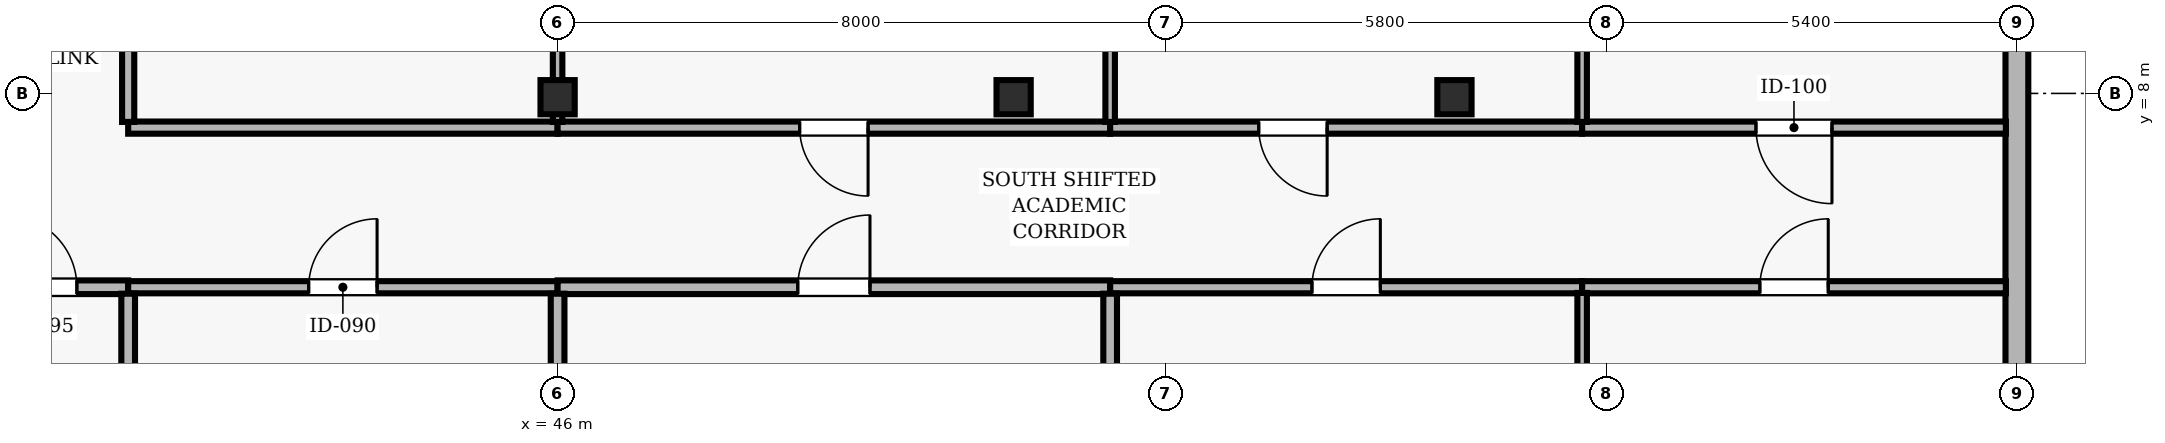
"""IFC4 building model, lengths in metres.
Left out: names, types, materials, properties, quantities, classifications, styles, units other than length and angle.
Written with IfcOpenShell. Run it as: python <this file> out.ifc"""

import sys

from ifc_helpers import new_model, si_unit, direction, frame, frame_2d, origin, origin_2d, place, context, subcontext, project, spatial, rectangle, hollow_rectangle, extrude, element, fill, save


model = new_model("IFC4")
c1 = context("Model", 3, precision=1e-05, world=origin(), true_north=direction((0.0, 1.0)))
c2 = subcontext(c1, "Body", "Model", "MODEL_VIEW")
j1 = project(units=[si_unit("LENGTHUNIT", "METRE"), si_unit("PLANEANGLEUNIT", "RADIAN")], contexts=[c1])
p1 = place(None, origin())
s1 = spatial("IfcSite", under=j1, at=p1, CompositionType="ELEMENT")
p2 = place(p1, origin())
s2 = spatial("IfcBuilding", under=s1, at=p2, CompositionType="ELEMENT")
p3 = place(p2, frame((0.0, 0.0, 203.1)))
s3 = spatial("IfcBuildingStorey", under=s2, at=p3, CompositionType="ELEMENT", Elevation=203.1)
for number, where, z_axis, x_axis in (
    (1, (46.0, 7.95, 0.0), (0.0, 0.0, 1.0), (1.0, 0.0, 0.0)),
    (2, (52.0, 7.95, 0.0), (0.0, 0.0, 1.0), (1.0, 0.0, 0.0)),
    (3, (57.8, 7.95, 0.0), (0.0, 0.0, 1.0), (1.0, 0.0, 0.0)),
):
    element("IfcColumn", number, at=place(p3, frame(where, z_axis=z_axis, x_axis=x_axis)), inside=s3, PredefinedType="COLUMN", context=c2, shape_type="SweptSolid", body=[
        extrude(hollow_rectangle(XDim=0.45, YDim=0.45, WallThickness=0.02, at=origin_2d()), origin(), (0.0, 0.0, 1.0), 3.9),
    ])
p4 = place(p3, frame((65.2, 2.5, 0.0), z_axis=(0.0, 0.0, 1.0), x_axis=(0.0, 1.0, 0.0)))
e4 = element("IfcWall", 4, at=p4, inside=s3, PredefinedType="SOLIDWALL", context=c2, shape_type="SweptSolid", body=[
    extrude(rectangle(XDim=11.0, YDim=0.3, at=frame_2d((5.5, 0.0))), origin(), (0.0, 0.0, 1.0), 3.69),
])
p5 = place(p4, frame((7.2, 0.0, 0.9)))
e5 = element("IfcOpeningElement", 5, at=p5, cuts=e4, PredefinedType="OPENING", context=c2, shape_type="SweptSolid", body=[
    extrude(rectangle(XDim=2.1, YDim=1.6, at=frame_2d((1.05, 0.8))), frame((0.0, 0.16, 0.0), z_axis=(0.0, -1.0, 0.0), x_axis=(1.0, 0.0, 0.0)), (0.0, 0.0, 1.0), 0.32),
])
p6 = place(p3, frame((38.05, 5.45, 0.0), z_axis=(0.0, 0.0, 1.0), x_axis=(1.0, 0.0, 0.0)))
e6 = element("IfcWall", 6, at=p6, inside=s3, PredefinedType="PARTITIONING", context=c2, shape_type="SweptSolid", body=[
    extrude(rectangle(XDim=2.3, YDim=0.18, at=frame_2d((1.15, 0.0))), origin(), (0.0, 0.0, 1.0), 3.372),
])
p7 = place(p6, frame((0.675, 0.0, 0.0)))
e7 = element("IfcOpeningElement", 7, at=p7, cuts=e6, PredefinedType="OPENING", context=c2, shape_type="SweptSolid", body=[
    extrude(rectangle(XDim=0.95, YDim=2.1, at=frame_2d((0.475, 1.05))), frame((0.0, 0.1, 0.0), z_axis=(0.0, -1.0, 0.0), x_axis=(1.0, 0.0, 0.0)), (0.0, 0.0, 1.0), 0.2),
])
p8 = place(p3, frame((40.35, 5.45, 0.0), z_axis=(0.0, 0.0, 1.0), x_axis=(1.0, 0.0, 0.0)))
e8 = element("IfcWall", 8, at=p8, inside=s3, PredefinedType="PARTITIONING", context=c2, shape_type="SweptSolid", body=[
    extrude(rectangle(XDim=5.65, YDim=0.16, at=frame_2d((2.825, 0.0))), origin(), (0.0, 0.0, 1.0), 3.372),
])
p9 = place(p8, frame((2.375, 0.0, 0.0)))
e9 = element("IfcOpeningElement", 9, at=p9, cuts=e8, PredefinedType="OPENING", context=c2, shape_type="SweptSolid", body=[
    extrude(rectangle(XDim=0.9, YDim=2.1, at=frame_2d((0.45, 1.05))), frame((0.0, 0.09, 0.0), z_axis=(0.0, -1.0, 0.0), x_axis=(1.0, 0.0, 0.0)), (0.0, 0.0, 1.0), 0.18),
])
p10 = place(p3, frame((46.0, 5.45, 0.0), z_axis=(0.0, 0.0, 1.0), x_axis=(1.0, 0.0, 0.0)))
e10 = element("IfcWall", 10, at=p10, inside=s3, PredefinedType="PARTITIONING", context=c2, shape_type="SweptSolid", body=[
    extrude(rectangle(XDim=7.27, YDim=0.18, at=frame_2d((3.635, 0.0))), origin(), (0.0, 0.0, 1.0), 3.372),
])
p11 = place(p10, frame((3.16, 0.0, 0.0)))
e11 = element("IfcOpeningElement", 11, at=p11, cuts=e10, PredefinedType="OPENING", context=c2, shape_type="SweptSolid", body=[
    extrude(rectangle(XDim=0.95, YDim=2.1, at=frame_2d((0.475, 1.05))), frame((0.0, 0.1, 0.0), z_axis=(0.0, -1.0, 0.0), x_axis=(1.0, 0.0, 0.0)), (0.0, 0.0, 1.0), 0.2),
])
p12 = place(p3, frame((46.0, 7.55, 0.0), z_axis=(0.0, 0.0, 1.0), x_axis=(-1.0, 0.0, 0.0)))
e12 = element("IfcWall", 12, at=p12, inside=s3, PredefinedType="PARTITIONING", context=c2, shape_type="SweptSolid", body=[
    extrude(rectangle(XDim=5.65, YDim=0.16, at=frame_2d((2.825, 0.0))), origin(), (0.0, 0.0, 1.0), 3.146),
])
p13 = place(p3, frame((53.27, 5.45, 0.0), z_axis=(0.0, 0.0, 1.0), x_axis=(1.0, 0.0, 0.0)))
e13 = element("IfcWall", 13, at=p13, inside=s3, PredefinedType="PARTITIONING", context=c2, shape_type="SweptSolid", body=[
    extrude(rectangle(XDim=6.21, YDim=0.16, at=frame_2d((3.105, 0.0))), origin(), (0.0, 0.0, 1.0), 3.372),
])
p14 = place(p13, frame((2.655, 0.0, 0.0)))
e14 = element("IfcOpeningElement", 14, at=p14, cuts=e13, PredefinedType="OPENING", context=c2, shape_type="SweptSolid", body=[
    extrude(rectangle(XDim=0.9, YDim=2.1, at=frame_2d((0.45, 1.05))), frame((0.0, 0.09, 0.0), z_axis=(0.0, -1.0, 0.0), x_axis=(1.0, 0.0, 0.0)), (0.0, 0.0, 1.0), 0.18),
])
p15 = place(p3, frame((53.27, 7.55, 0.0), z_axis=(0.0, 0.0, 1.0), x_axis=(-1.0, 0.0, 0.0)))
e15 = element("IfcWall", 15, at=p15, inside=s3, PredefinedType="PARTITIONING", context=c2, shape_type="SweptSolid", body=[
    extrude(rectangle(XDim=7.27, YDim=0.16, at=frame_2d((3.635, 0.0))), origin(), (0.0, 0.0, 1.0), 3.146),
])
p16 = place(p15, frame((3.185, 0.0, 0.0)))
e16 = element("IfcOpeningElement", 16, at=p16, cuts=e15, PredefinedType="OPENING", context=c2, shape_type="SweptSolid", body=[
    extrude(rectangle(XDim=0.9, YDim=2.1, at=frame_2d((0.45, 1.05))), frame((0.0, 0.09, 0.0), z_axis=(0.0, -1.0, 0.0), x_axis=(1.0, 0.0, 0.0)), (0.0, 0.0, 1.0), 0.18),
])
p17 = place(p3, frame((59.48, 5.45, 0.0), z_axis=(0.0, 0.0, 1.0), x_axis=(1.0, 0.0, 0.0)))
e17 = element("IfcWall", 17, at=p17, inside=s3, PredefinedType="PARTITIONING", context=c2, shape_type="SweptSolid", body=[
    extrude(rectangle(XDim=5.575, YDim=0.16, at=frame_2d((2.788, 0.0))), origin(), (0.0, 0.0, 1.0), 3.69),
])
p18 = place(p17, frame((2.338, 0.0, 0.0)))
e18 = element("IfcOpeningElement", 18, at=p18, cuts=e17, PredefinedType="OPENING", context=c2, shape_type="SweptSolid", body=[
    extrude(rectangle(XDim=0.9, YDim=2.1, at=frame_2d((0.45, 1.05))), frame((0.0, 0.09, 0.0), z_axis=(0.0, -1.0, 0.0), x_axis=(1.0, 0.0, 0.0)), (0.0, 0.0, 1.0), 0.18),
])
p19 = place(p3, frame((59.48, 7.55, 0.0), z_axis=(0.0, 0.0, 1.0), x_axis=(-1.0, 0.0, 0.0)))
e19 = element("IfcWall", 19, at=p19, inside=s3, PredefinedType="PARTITIONING", context=c2, shape_type="SweptSolid", body=[
    extrude(rectangle(XDim=6.21, YDim=0.16, at=frame_2d((3.105, 0.0))), origin(), (0.0, 0.0, 1.0), 3.146),
])
p20 = place(p19, frame((3.355, 0.0, 0.0)))
e20 = element("IfcOpeningElement", 20, at=p20, cuts=e19, PredefinedType="OPENING", context=c2, shape_type="SweptSolid", body=[
    extrude(rectangle(XDim=0.9, YDim=2.1, at=frame_2d((0.45, 1.05))), frame((0.0, 0.09, 0.0), z_axis=(0.0, -1.0, 0.0), x_axis=(1.0, 0.0, 0.0)), (0.0, 0.0, 1.0), 0.18),
])
p21 = place(p3, frame((65.055, 7.55, 0.0), z_axis=(0.0, 0.0, 1.0), x_axis=(-1.0, 0.0, 0.0)))
e21 = element("IfcWall", 21, at=p21, inside=s3, PredefinedType="PARTITIONING", context=c2, shape_type="SweptSolid", body=[
    extrude(rectangle(XDim=5.575, YDim=0.16, at=frame_2d((2.788, 0.0))), origin(), (0.0, 0.0, 1.0), 3.69),
])
p22 = place(p21, frame((2.288, 0.0, 0.0)))
e22 = element("IfcOpeningElement", 22, at=p22, cuts=e21, PredefinedType="OPENING", context=c2, shape_type="SweptSolid", body=[
    extrude(rectangle(XDim=1.0, YDim=2.1, at=frame_2d((0.5, 1.05))), frame((0.0, 0.09, 0.0), z_axis=(0.0, -1.0, 0.0), x_axis=(1.0, 0.0, 0.0)), (0.0, 0.0, 1.0), 0.18),
])
p23 = place(p3, frame((40.35, 0.145, 0.0), z_axis=(0.0, 0.0, 1.0), x_axis=(0.0, 1.0, 0.0)))
e23 = element("IfcWall", 23, at=p23, inside=s3, PredefinedType="PARTITIONING", context=c2, shape_type="SweptSolid", body=[
    extrude(rectangle(XDim=5.22, YDim=0.18, at=frame_2d((2.61, 0.0))), origin(), (0.0, 0.0, 1.0), 3.69),
])
p24 = place(p3, frame((40.35, 7.625, 0.0), z_axis=(0.0, 0.0, 1.0), x_axis=(0.0, 1.0, 0.0)))
e24 = element("IfcWall", 24, at=p24, inside=s3, PredefinedType="PARTITIONING", context=c2, shape_type="SweptSolid", body=[
    extrude(rectangle(XDim=8.3, YDim=0.16, at=frame_2d((4.15, 0.0))), origin(), (0.0, 0.0, 1.0), 3.372),
])
p25 = place(p24, frame((3.7, 0.0, 0.0)))
e25 = element("IfcOpeningElement", 25, at=p25, cuts=e24, PredefinedType="OPENING", context=c2, shape_type="SweptSolid", body=[
    extrude(rectangle(XDim=0.9, YDim=2.1, at=frame_2d((0.45, 1.05))), frame((0.0, 0.09, 0.0), z_axis=(0.0, -1.0, 0.0), x_axis=(1.0, 0.0, 0.0)), (0.0, 0.0, 1.0), 0.18),
])
p26 = place(p3, frame((46.0, 0.145, 0.0), z_axis=(0.0, 0.0, 1.0), x_axis=(0.0, 1.0, 0.0)))
e26 = element("IfcWall", 26, at=p26, inside=s3, PredefinedType="PARTITIONING", context=c2, shape_type="SweptSolid", body=[
    extrude(rectangle(XDim=5.22, YDim=0.18, at=frame_2d((2.61, 0.0))), origin(), (0.0, 0.0, 1.0), 3.146),
])
p27 = place(p3, frame((46.0, 7.625, 0.0), z_axis=(0.0, 0.0, 1.0), x_axis=(0.0, 1.0, 0.0)))
e27 = element("IfcWall", 27, at=p27, inside=s3, PredefinedType="PARTITIONING", context=c2, shape_type="SweptSolid", body=[
    extrude(rectangle(XDim=8.318, YDim=0.125, at=frame_2d((4.159, 0.0))), origin(), (0.0, 0.0, 1.0), 3.146),
])
p28 = place(p3, frame((53.27, 0.145, 0.0), z_axis=(0.0, 0.0, 1.0), x_axis=(0.0, 1.0, 0.0)))
e28 = element("IfcWall", 28, at=p28, inside=s3, PredefinedType="PARTITIONING", context=c2, shape_type="SweptSolid", body=[
    extrude(rectangle(XDim=5.22, YDim=0.18, at=frame_2d((2.61, 0.0))), origin(), (0.0, 0.0, 1.0), 3.69),
])
p29 = place(p3, frame((53.27, 7.625, 0.0), z_axis=(0.0, 0.0, 1.0), x_axis=(0.0, 1.0, 0.0)))
e29 = element("IfcWall", 29, at=p29, inside=s3, PredefinedType="PARTITIONING", context=c2, shape_type="SweptSolid", body=[
    extrude(rectangle(XDim=8.23, YDim=0.125, at=frame_2d((4.115, 0.0))), origin(), (0.0, 0.0, 1.0), 3.69),
])
p30 = place(p3, frame((59.48, 0.145, 0.0), z_axis=(0.0, 0.0, 1.0), x_axis=(0.0, 1.0, 0.0)))
e30 = element("IfcWall", 30, at=p30, inside=s3, PredefinedType="PARTITIONING", context=c2, shape_type="SweptSolid", body=[
    extrude(rectangle(XDim=5.23, YDim=0.125, at=frame_2d((2.615, 0.0))), origin(), (0.0, 0.0, 1.0), 3.69),
])
p31 = place(p3, frame((59.48, 7.625, 0.0), z_axis=(0.0, 0.0, 1.0), x_axis=(0.0, 1.0, 0.0)))
e31 = element("IfcWall", 31, at=p31, inside=s3, PredefinedType="PARTITIONING", context=c2, shape_type="SweptSolid", body=[
    extrude(rectangle(XDim=8.23, YDim=0.125, at=frame_2d((4.115, 0.0))), origin(), (0.0, 0.0, 1.0), 3.69),
])
p32 = place(p7, origin())
e32 = element("IfcDoor", 32, at=p32, inside=s3, OperationType="SINGLE_SWING_LEFT", PredefinedType="DOOR", context=c2, shape_type="SweptSolid", body=[
    extrude(rectangle(XDim=0.95, YDim=2.1, at=frame_2d((0.475, 1.05))), frame((0.0, 0.025, 0.0), z_axis=(0.0, -1.0, 0.0), x_axis=(1.0, 0.0, 0.0)), (0.0, 0.0, 1.0), 0.05),
])
fill(e7, e32)
p33 = place(p9, origin())
e33 = element("IfcDoor", 33, at=p33, inside=s3, OperationType="SINGLE_SWING_RIGHT", PredefinedType="DOOR", context=c2, shape_type="SweptSolid", body=[
    extrude(rectangle(XDim=0.9, YDim=2.1, at=frame_2d((0.45, 1.05))), frame((0.0, 0.025, 0.0), z_axis=(0.0, -1.0, 0.0), x_axis=(1.0, 0.0, 0.0)), (0.0, 0.0, 1.0), 0.05),
])
fill(e9, e33)
p34 = place(p11, origin())
e34 = element("IfcDoor", 34, at=p34, inside=s3, OperationType="SINGLE_SWING_RIGHT", PredefinedType="DOOR", context=c2, shape_type="SweptSolid", body=[
    extrude(rectangle(XDim=0.95, YDim=2.1, at=frame_2d((0.475, 1.05))), frame((0.0, 0.025, 0.0), z_axis=(0.0, -1.0, 0.0), x_axis=(1.0, 0.0, 0.0)), (0.0, 0.0, 1.0), 0.05),
])
fill(e11, e34)
p35 = place(p16, origin())
e35 = element("IfcDoor", 35, at=p35, inside=s3, OperationType="SINGLE_SWING_LEFT", PredefinedType="DOOR", context=c2, shape_type="SweptSolid", body=[
    extrude(rectangle(XDim=0.9, YDim=2.1, at=frame_2d((0.45, 1.05))), frame((0.0, 0.025, 0.0), z_axis=(0.0, -1.0, 0.0), x_axis=(1.0, 0.0, 0.0)), (0.0, 0.0, 1.0), 0.05),
])
fill(e16, e35)
p36 = place(p14, origin())
e36 = element("IfcDoor", 36, at=p36, inside=s3, OperationType="SINGLE_SWING_RIGHT", PredefinedType="DOOR", context=c2, shape_type="SweptSolid", body=[
    extrude(rectangle(XDim=0.9, YDim=2.1, at=frame_2d((0.45, 1.05))), frame((0.0, 0.025, 0.0), z_axis=(0.0, -1.0, 0.0), x_axis=(1.0, 0.0, 0.0)), (0.0, 0.0, 1.0), 0.05),
])
fill(e14, e36)
p37 = place(p20, origin())
e37 = element("IfcDoor", 37, at=p37, inside=s3, OperationType="SINGLE_SWING_LEFT", PredefinedType="DOOR", context=c2, shape_type="SweptSolid", body=[
    extrude(rectangle(XDim=0.9, YDim=2.1, at=frame_2d((0.45, 1.05))), frame((0.0, 0.025, 0.0), z_axis=(0.0, -1.0, 0.0), x_axis=(1.0, 0.0, 0.0)), (0.0, 0.0, 1.0), 0.05),
])
fill(e20, e37)
p38 = place(p18, origin())
e38 = element("IfcDoor", 38, at=p38, inside=s3, OperationType="SINGLE_SWING_RIGHT", PredefinedType="DOOR", context=c2, shape_type="SweptSolid", body=[
    extrude(rectangle(XDim=0.9, YDim=2.1, at=frame_2d((0.45, 1.05))), frame((0.0, 0.025, 0.0), z_axis=(0.0, -1.0, 0.0), x_axis=(1.0, 0.0, 0.0)), (0.0, 0.0, 1.0), 0.05),
])
fill(e18, e38)
p39 = place(p22, origin())
e39 = element("IfcDoor", 39, at=p39, inside=s3, OperationType="SINGLE_SWING_LEFT", PredefinedType="DOOR", context=c2, shape_type="SweptSolid", body=[
    extrude(rectangle(XDim=1.0, YDim=2.1, at=frame_2d((0.5, 1.05))), frame((0.0, 0.025, 0.0), z_axis=(0.0, -1.0, 0.0), x_axis=(1.0, 0.0, 0.0)), (0.0, 0.0, 1.0), 0.05),
])
fill(e22, e39)
save(model, sys.argv[1])
